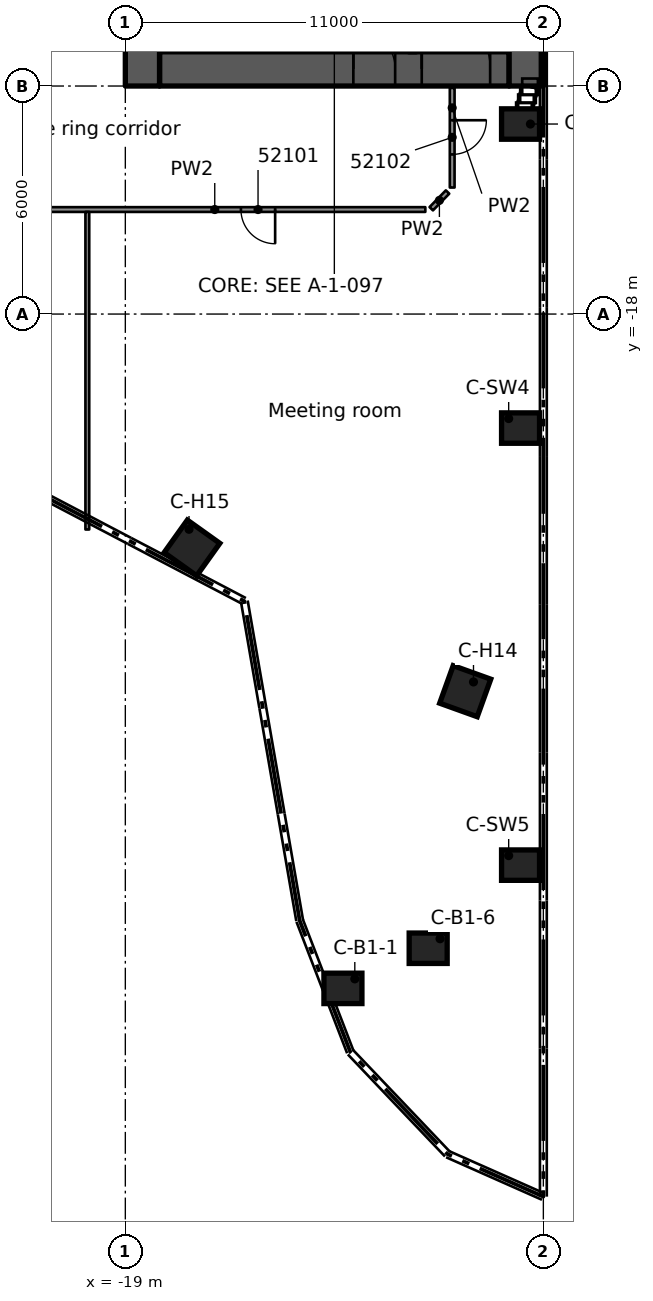
"""IFC4 building model, lengths in metres.
Left out: names, types, materials, properties, quantities, classifications, styles, units other than length and angle.
Written with IfcOpenShell. Run it as: python <this file> out.ifc"""

import sys

from ifc_helpers import new_model, si_unit, direction, frame, frame_2d, origin, origin_2d, place, context, subcontext, project, spatial, rectangle, extrude, element, fill, save


model = new_model("IFC4")
c1 = context("Model", 3, precision=1e-05, world=origin(), true_north=direction((0.0, 1.0)))
c2 = subcontext(c1, "Body", "Model", "MODEL_VIEW")
j1 = project(units=[si_unit("LENGTHUNIT", "METRE"), si_unit("PLANEANGLEUNIT", "RADIAN")], contexts=[c1])
p1 = place(None, origin())
s1 = spatial("IfcSite", under=j1, at=p1, CompositionType="ELEMENT")
p2 = place(p1, origin())
s2 = spatial("IfcBuilding", under=s1, at=p2, CompositionType="ELEMENT")
p3 = place(p2, frame((0.0, 0.0, 257.0)))
s3 = spatial("IfcBuildingStorey", under=s2, at=p3, CompositionType="ELEMENT", Elevation=257.0)
p4 = place(p3, frame((-18.1, -11.55, 0.0), z_axis=(0.0, 0.0, 1.0), x_axis=(1.0, 0.0, 0.0)))
e1 = element("IfcWall", 1, at=p4, inside=s3, PredefinedType="SHEAR", context=c2, shape_type="SweptSolid", body=[
    extrude(rectangle(XDim=9.2, YDim=0.9, at=frame_2d((4.6, 0.0))), origin(), (0.0, 0.0, 1.0), 3.5),
])
p5 = place(p4, frame((6.9, 0.0, 0.0)))
e2 = element("IfcOpeningElement", 2, at=p5, cuts=e1, PredefinedType="OPENING", context=c2, shape_type="SweptSolid", body=[
    extrude(rectangle(XDim=1.8, YDim=2.1, at=frame_2d((0.9, 1.05))), frame((0.0, 0.46, 0.0), z_axis=(0.0, -1.0, 0.0), x_axis=(1.0, 0.0, 0.0)), (0.0, 0.0, 1.0), 0.92),
])
p6 = place(p4, frame((5.1, 0.0, 0.0)))
e3 = element("IfcOpeningElement", 3, at=p6, cuts=e1, PredefinedType="OPENING", context=c2, shape_type="SweptSolid", body=[
    extrude(rectangle(XDim=1.1, YDim=2.1, at=frame_2d((0.55, 1.05))), frame((0.0, 0.46, 0.0), z_axis=(0.0, -1.0, 0.0), x_axis=(1.0, 0.0, 0.0)), (0.0, 0.0, 1.0), 0.92),
])
p7 = place(p3, frame((-18.55, -12.0, 0.0), z_axis=(0.0, 0.0, 1.0), x_axis=(0.0, 1.0, 0.0)))
e4 = element("IfcWall", 4, at=p7, inside=s3, PredefinedType="SHEAR", context=c2, shape_type="SweptSolid", body=[
    extrude(rectangle(XDim=24.0, YDim=0.9, at=frame_2d((12.0, 0.0))), origin(), (0.0, 0.0, 1.0), 3.5),
])
p8 = place(p7, frame((10.1, 0.0, 0.0)))
e5 = element("IfcOpeningElement", 5, at=p8, cuts=e4, PredefinedType="OPENING", context=c2, shape_type="SweptSolid", body=[
    extrude(rectangle(XDim=1.8, YDim=2.1, at=frame_2d((0.9, 1.05))), frame((0.0, 0.46, 0.0), z_axis=(0.0, -1.0, 0.0), x_axis=(1.0, 0.0, 0.0)), (0.0, 0.0, 1.0), 0.92),
])
p9 = place(p3, frame((-8.45, -12.0, 0.0), z_axis=(0.0, 0.0, 1.0), x_axis=(0.0, 1.0, 0.0)))
e6 = element("IfcWall", 6, at=p9, inside=s3, PredefinedType="SHEAR", context=c2, shape_type="SweptSolid", body=[
    extrude(rectangle(XDim=24.0, YDim=0.9, at=frame_2d((12.0, 0.0))), origin(), (0.0, 0.0, 1.0), 3.5),
])
for number, where, z_axis, x_axis in (
    (7, (-13.274, -35.743, 0.0), (0.0, 0.0, 1.0), (1.0, 0.0, 0.0)),
    (8, (-11.031, -34.687, 0.0), (0.0, 0.0, 1.0), (1.0, 0.0, 0.0)),
):
    element("IfcColumn", number, at=place(p3, frame(where, z_axis=z_axis, x_axis=x_axis)), inside=s3, PredefinedType="COLUMN", context=c2, shape_type="SweptSolid", body=[
        extrude(rectangle(XDim=1.0, YDim=0.8, at=origin_2d()), origin(), (0.0, 0.0, 1.0), 3.5),
    ])
for number, where, z_axis, x_axis in (
    (9, (-10.056, -27.923, 0.0), (0.0, 0.0, 1.0), (-0.339, -0.941, 0.0)),
    (10, (-17.246, -24.154, 0.0), (0.0, 0.0, 1.0), (-0.581, -0.814, 0.0)),
):
    element("IfcColumn", number, at=place(p3, frame(where, z_axis=z_axis, x_axis=x_axis)), inside=s3, PredefinedType="COLUMN", context=c2, shape_type="SweptSolid", body=[
        extrude(rectangle(XDim=1.05, YDim=1.05, at=origin_2d()), origin(), (0.0, 0.0, 1.0), 3.5),
    ])
for number, where, z_axis, x_axis in (
    (11, (-8.6, -13.0, 0.0), (0.0, 0.0, 1.0), (1.0, 0.0, 0.0)),
    (12, (-8.6, -21.0, 0.0), (0.0, 0.0, 1.0), (1.0, 0.0, 0.0)),
    (13, (-8.6, -32.5, 0.0), (0.0, 0.0, 1.0), (1.0, 0.0, 0.0)),
):
    element("IfcColumn", number, at=place(p3, frame(where, z_axis=z_axis, x_axis=x_axis)), inside=s3, PredefinedType="COLUMN", context=c2, shape_type="SweptSolid", body=[
        extrude(rectangle(XDim=1.0, YDim=0.8, at=origin_2d()), origin(), (0.0, 0.0, 1.0), 3.5),
    ])
p10 = place(p3, frame((-11.106, -15.25, 0.0), z_axis=(0.0, 0.0, 1.0), x_axis=(-1.0, 0.0, 0.0)))
e14 = element("IfcWall", 14, at=p10, inside=s3, PredefinedType="PARTITIONING", context=c2, shape_type="SweptSolid", body=[
    extrude(rectangle(XDim=11.082, YDim=0.125, at=frame_2d((5.541, 0.0))), origin(), (0.0, 0.0, 1.0), 3.08),
])
p11 = place(p10, frame((3.952, 0.0, 0.0)))
e15 = element("IfcOpeningElement", 15, at=p11, cuts=e14, PredefinedType="OPENING", context=c2, shape_type="SweptSolid", body=[
    extrude(rectangle(XDim=0.9, YDim=2.1, at=frame_2d((0.45, 1.05))), frame((0.0, 0.073, 0.0), z_axis=(0.0, -1.0, 0.0), x_axis=(1.0, 0.0, 0.0)), (0.0, 0.0, 1.0), 0.145),
])
p12 = place(p3, frame((-10.95, -15.229, 0.0), z_axis=(0.0, 0.0, 1.0), x_axis=(0.698110320765, 0.715990209459, 0.0)))
e16 = element("IfcWall", 16, at=p12, inside=s3, PredefinedType="PARTITIONING", context=c2, shape_type="SweptSolid", body=[
    extrude(rectangle(XDim=0.615, YDim=0.125, at=frame_2d((0.307, 0.0))), origin(), (0.0, 0.0, 1.0), 3.08),
])
p13 = place(p3, frame((-10.399, -12.05, 0.0), z_axis=(0.0, 0.0, 1.0), x_axis=(0.0, -1.0, 0.0)))
e17 = element("IfcWall", 17, at=p13, inside=s3, PredefinedType="PARTITIONING", context=c2, shape_type="SweptSolid", body=[
    extrude(rectangle(XDim=2.621, YDim=0.125, at=frame_2d((1.311, 0.0))), origin(), (0.0, 0.0, 1.0), 3.08),
])
p14 = place(p13, frame((0.85, 0.0, 0.0)))
e18 = element("IfcOpeningElement", 18, at=p14, cuts=e17, PredefinedType="OPENING", context=c2, shape_type="SweptSolid", body=[
    extrude(rectangle(XDim=0.9, YDim=2.1, at=frame_2d((0.45, 1.05))), frame((0.0, 0.073, 0.0), z_axis=(0.0, -1.0, 0.0), x_axis=(1.0, 0.0, 0.0)), (0.0, 0.0, 1.0), 0.145),
])
p15 = place(p3, frame((-20.0, -23.669, 0.0), z_axis=(0.0, 0.0, 1.0), x_axis=(0.0, 1.0, 0.0)))
e19 = element("IfcWall", 19, at=p15, inside=s3, PredefinedType="PARTITIONING", context=c2, shape_type="SweptSolid", body=[
    extrude(rectangle(XDim=8.357, YDim=0.1, at=frame_2d((4.178, 0.0))), origin(), (0.0, 0.0, 1.0), 3.08),
])
p16 = place(p5, origin())
e20 = element("IfcDoor", 20, at=p16, inside=s3, OperationType="SINGLE_SWING_RIGHT", PredefinedType="DOOR", context=c2, shape_type="SweptSolid", body=[
    extrude(rectangle(XDim=1.8, YDim=2.1, at=frame_2d((0.9, 1.05))), frame((0.0, 0.025, 0.0), z_axis=(0.0, -1.0, 0.0), x_axis=(1.0, 0.0, 0.0)), (0.0, 0.0, 1.0), 0.05),
])
fill(e2, e20)
p17 = place(p6, origin())
e21 = element("IfcDoor", 21, at=p17, inside=s3, OperationType="SINGLE_SWING_RIGHT", PredefinedType="DOOR", context=c2, shape_type="SweptSolid", body=[
    extrude(rectangle(XDim=1.1, YDim=2.1, at=frame_2d((0.55, 1.05))), frame((0.0, 0.025, 0.0), z_axis=(0.0, -1.0, 0.0), x_axis=(1.0, 0.0, 0.0)), (0.0, 0.0, 1.0), 0.05),
])
fill(e3, e21)
p18 = place(p11, origin())
e22 = element("IfcDoor", 22, at=p18, inside=s3, OperationType="SINGLE_SWING_LEFT", PredefinedType="DOOR", context=c2, shape_type="SweptSolid", body=[
    extrude(rectangle(XDim=0.9, YDim=2.1, at=frame_2d((0.45, 1.05))), frame((0.0, 0.025, 0.0), z_axis=(0.0, -1.0, 0.0), x_axis=(1.0, 0.0, 0.0)), (0.0, 0.0, 1.0), 0.05),
])
fill(e15, e22)
p19 = place(p14, origin())
e23 = element("IfcDoor", 23, at=p19, inside=s3, OperationType="SINGLE_SWING_LEFT", PredefinedType="DOOR", context=c2, shape_type="SweptSolid", body=[
    extrude(rectangle(XDim=0.9, YDim=2.1, at=frame_2d((0.45, 1.05))), frame((0.0, 0.025, 0.0), z_axis=(0.0, -1.0, 0.0), x_axis=(1.0, 0.0, 0.0)), (0.0, 0.0, 1.0), 0.05),
])
fill(e18, e23)
save(model, sys.argv[1])
